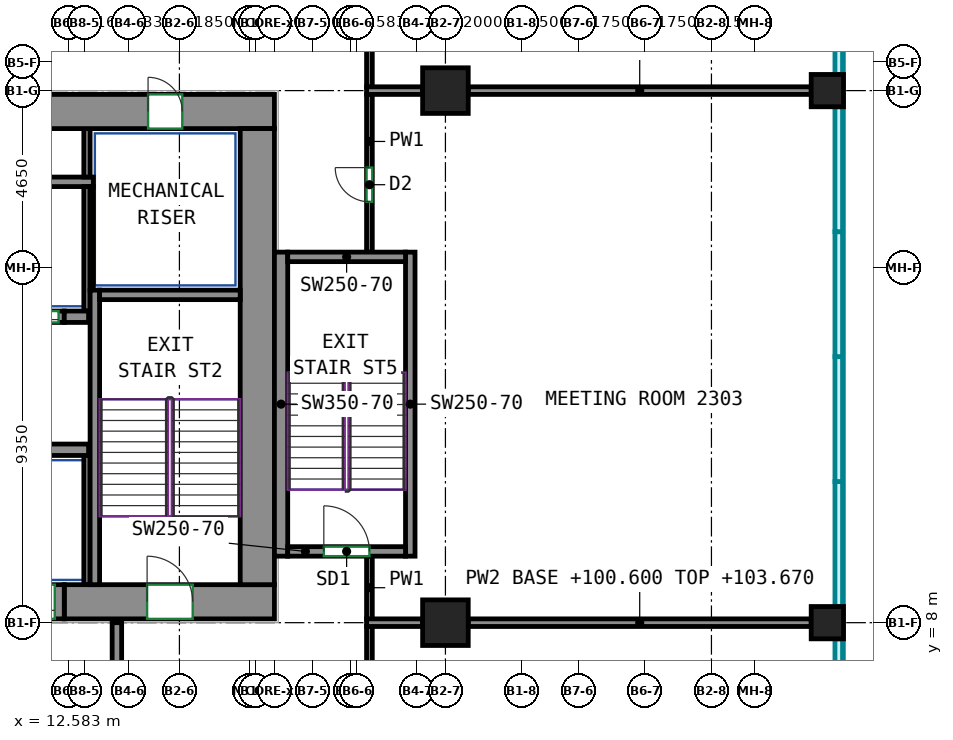
"""IFC4 building model, lengths in metres.
Left out: names, types, materials, properties, quantities, classifications, styles, units other than length and angle.
Written with IfcOpenShell. Run it as: python <this file> out.ifc"""

import sys

from ifc_helpers import new_model, si_unit, direction, frame, frame_2d, origin, origin_2d, place, context, subcontext, project, spatial, rectangle, extrude, source, transform, mapped, element, fill, save


model = new_model("IFC4")
c1 = context("Model", 3, precision=1e-05, world=origin(), true_north=direction((0.0, 1.0)))
c2 = subcontext(c1, "Body", "Model", "MODEL_VIEW")
j1 = project(units=[si_unit("LENGTHUNIT", "METRE"), si_unit("PLANEANGLEUNIT", "RADIAN")], contexts=[c1])
p1 = place(None, origin())
s1 = spatial("IfcSite", under=j1, at=p1, CompositionType="ELEMENT")
p2 = place(p1, origin())
s2 = spatial("IfcBuilding", under=s1, at=p2, CompositionType="ELEMENT")
p3 = place(p2, frame((0.0, 0.0, 100.6)))
s3 = spatial("IfcBuildingStorey", under=s2, at=p3, CompositionType="ELEMENT", Elevation=100.6)
m1 = source(origin(), c2, "Body", "SweptSolid", [
    extrude(rectangle(XDim=1.2, YDim=1.2, at=origin_2d()), origin(), (0.0, 0.0, 1.0), 3.72),
])
for number, where, z_axis, x_axis in (
    (1, (22.5, 8.0, 0.0), (0.0, 0.0, 1.0), (1.0, 0.0, 0.0)),
    (2, (22.5, 22.0, 0.0), (0.0, 0.0, 1.0), (1.0, 0.0, 0.0)),
):
    element("IfcColumn", number, at=place(p3, frame(where, z_axis=z_axis, x_axis=x_axis)), inside=s3, PredefinedType="COLUMN", context=c2, shape_type="MappedRepresentation", body=[
        mapped(m1, transform((0.0, 0.0, 0.0))),
    ])
m2 = source(origin(), c2, "Body", "SweptSolid", [
    extrude(rectangle(XDim=0.85, YDim=0.85, at=origin_2d()), origin(), (0.0, 0.0, 1.0), 3.72),
])
for number, where, z_axis, x_axis in (
    (3, (32.55, 8.0, 0.0), (0.0, 0.0, 1.0), (1.0, 0.0, 0.0)),
    (4, (32.55, 22.0, 0.0), (0.0, 0.0, 1.0), (1.0, 0.0, 0.0)),
):
    element("IfcColumn", number, at=place(p3, frame(where, z_axis=z_axis, x_axis=x_axis)), inside=s3, PredefinedType="COLUMN", context=c2, shape_type="MappedRepresentation", body=[
        mapped(m2, transform((0.0, 0.0, 0.0))),
    ])
m3 = source(origin(), c2, "Body", "SweptSolid", [
    extrude(rectangle(XDim=5.53, YDim=0.9, at=frame_2d((2.765, 0.0))), origin(), (0.0, 0.0, 1.0), 3.72),
])
p4 = place(p3, frame((12.47, 8.55, 0.0), z_axis=(0.0, 0.0, 1.0), x_axis=(1.0, 0.0, 0.0)))
e5 = element("IfcWall", 5, at=p4, inside=s3, PredefinedType="SHEAR", context=c2, shape_type="MappedRepresentation", body=[
    mapped(m3, transform((0.0, 0.0, 0.0))),
])
p5 = place(p4, frame((2.18, 0.0, 0.0)))
e6 = element("IfcOpeningElement", 6, at=p5, cuts=e5, PredefinedType="OPENING", context=c2, shape_type="SweptSolid", body=[
    extrude(rectangle(XDim=1.2, YDim=2.1, at=frame_2d((0.6, 1.05))), frame((0.0, 0.46, 0.0), z_axis=(0.0, -1.0, 0.0), x_axis=(1.0, 0.0, 0.0)), (0.0, 0.0, 1.0), 0.92),
])
m4 = source(origin(), c2, "Body", "SweptSolid", [
    extrude(rectangle(XDim=33.9, YDim=0.9, at=frame_2d((16.95, 0.0))), origin(), (0.0, 0.0, 1.0), 3.72),
])
p6 = place(p3, frame((-15.9, 21.45, 0.0), z_axis=(0.0, 0.0, 1.0), x_axis=(1.0, 0.0, 0.0)))
e7 = element("IfcWall", 7, at=p6, inside=s3, PredefinedType="SHEAR", context=c2, shape_type="MappedRepresentation", body=[
    mapped(m4, transform((0.0, 0.0, 0.0))),
])
p7 = place(p6, frame((6.008, 0.0, 0.0)))
e8 = element("IfcOpeningElement", 8, at=p7, cuts=e7, PredefinedType="OPENING", context=c2, shape_type="SweptSolid", body=[
    extrude(rectangle(XDim=0.9, YDim=2.1, at=frame_2d((0.45, 1.05))), frame((0.0, 0.46, 0.0), z_axis=(0.0, -1.0, 0.0), x_axis=(1.0, 0.0, 0.0)), (0.0, 0.0, 1.0), 0.92),
])
p8 = place(p6, frame((8.688, 0.0, 0.0)))
e9 = element("IfcOpeningElement", 9, at=p8, cuts=e7, PredefinedType="OPENING", context=c2, shape_type="SweptSolid", body=[
    extrude(rectangle(XDim=0.9, YDim=2.1, at=frame_2d((0.45, 1.05))), frame((0.0, 0.46, 0.0), z_axis=(0.0, -1.0, 0.0), x_axis=(1.0, 0.0, 0.0)), (0.0, 0.0, 1.0), 0.92),
])
p9 = place(p6, frame((12.185, 0.0, 0.0)))
e10 = element("IfcOpeningElement", 10, at=p9, cuts=e7, PredefinedType="OPENING", context=c2, shape_type="SweptSolid", body=[
    extrude(rectangle(XDim=0.9, YDim=2.1, at=frame_2d((0.45, 1.05))), frame((0.0, 0.46, 0.0), z_axis=(0.0, -1.0, 0.0), x_axis=(1.0, 0.0, 0.0)), (0.0, 0.0, 1.0), 0.92),
])
p10 = place(p6, frame((16.138, 0.0, 0.0)))
e11 = element("IfcOpeningElement", 11, at=p10, cuts=e7, PredefinedType="OPENING", context=c2, shape_type="SweptSolid", body=[
    extrude(rectangle(XDim=0.9, YDim=2.1, at=frame_2d((0.45, 1.05))), frame((0.0, 0.46, 0.0), z_axis=(0.0, -1.0, 0.0), x_axis=(1.0, 0.0, 0.0)), (0.0, 0.0, 1.0), 0.92),
])
p11 = place(p6, frame((20.962, 0.0, 0.0)))
e12 = element("IfcOpeningElement", 12, at=p11, cuts=e7, PredefinedType="OPENING", context=c2, shape_type="SweptSolid", body=[
    extrude(rectangle(XDim=0.9, YDim=2.1, at=frame_2d((0.45, 1.05))), frame((0.0, 0.46, 0.0), z_axis=(0.0, -1.0, 0.0), x_axis=(1.0, 0.0, 0.0)), (0.0, 0.0, 1.0), 0.92),
])
p12 = place(p6, frame((26.389, 0.0, 0.0)))
e13 = element("IfcOpeningElement", 13, at=p12, cuts=e7, PredefinedType="OPENING", context=c2, shape_type="SweptSolid", body=[
    extrude(rectangle(XDim=0.9, YDim=2.1, at=frame_2d((0.45, 1.05))), frame((0.0, 0.46, 0.0), z_axis=(0.0, -1.0, 0.0), x_axis=(1.0, 0.0, 0.0)), (0.0, 0.0, 1.0), 0.92),
])
p13 = place(p6, frame((2.425, 0.0, 0.0)))
e14 = element("IfcOpeningElement", 14, at=p13, cuts=e7, PredefinedType="OPENING", context=c2, shape_type="SweptSolid", body=[
    extrude(rectangle(XDim=0.9, YDim=2.1, at=frame_2d((0.45, 1.05))), frame((0.0, 0.46, 0.0), z_axis=(0.0, -1.0, 0.0), x_axis=(1.0, 0.0, 0.0)), (0.0, 0.0, 1.0), 0.92),
])
p14 = place(p6, frame((30.575, 0.0, 0.0)))
e15 = element("IfcOpeningElement", 15, at=p14, cuts=e7, PredefinedType="OPENING", context=c2, shape_type="SweptSolid", body=[
    extrude(rectangle(XDim=0.9, YDim=2.1, at=frame_2d((0.45, 1.05))), frame((0.0, 0.46, 0.0), z_axis=(0.0, -1.0, 0.0), x_axis=(1.0, 0.0, 0.0)), (0.0, 0.0, 1.0), 0.92),
])
m5 = source(origin(), c2, "Body", "SweptSolid", [
    extrude(rectangle(XDim=12.0, YDim=0.9, at=frame_2d((6.0, 0.0))), origin(), (0.0, 0.0, 1.0), 3.72),
])
p15 = place(p3, frame((17.55, 9.0, 0.0), z_axis=(0.0, 0.0, 1.0), x_axis=(0.0, 1.0, 0.0)))
e16 = element("IfcWall", 16, at=p15, inside=s3, PredefinedType="SHEAR", context=c2, shape_type="MappedRepresentation", body=[
    mapped(m5, transform((0.0, 0.0, 0.0))),
])
m6 = source(origin(), c2, "Body", "SweptSolid", [
    extrude(rectangle(XDim=7.75, YDim=0.25, at=frame_2d((3.875, 0.0))), origin(), (0.0, 0.0, 1.0), 3.72),
])
p16 = place(p3, frame((13.275, 9.0, 0.0), z_axis=(0.0, 0.0, 1.0), x_axis=(0.0, 1.0, 0.0)))
e17 = element("IfcWall", 17, at=p16, inside=s3, PredefinedType="SHEAR", context=c2, shape_type="MappedRepresentation", body=[
    mapped(m6, transform((0.0, 0.0, 0.0))),
])
m7 = source(origin(), c2, "Body", "SweptSolid", [
    extrude(rectangle(XDim=3.7, YDim=0.25, at=frame_2d((1.85, 0.0))), origin(), (0.0, 0.0, 1.0), 3.72),
])
p17 = place(p3, frame((13.4, 16.625, 0.0), z_axis=(0.0, 0.0, 1.0), x_axis=(1.0, 0.0, 0.0)))
e18 = element("IfcWall", 18, at=p17, inside=s3, PredefinedType="SHEAR", context=c2, shape_type="MappedRepresentation", body=[
    mapped(m7, transform((0.0, 0.0, 0.0))),
])
m8 = source(origin(), c2, "Body", "SweptSolid", [
    extrude(rectangle(XDim=8.0, YDim=0.35, at=frame_2d((4.0, 0.0))), origin(), (0.0, 0.0, 1.0), 3.72),
])
p18 = place(p3, frame((18.175, 9.75, 0.0), z_axis=(0.0, 0.0, 1.0), x_axis=(0.0, 1.0, 0.0)))
e19 = element("IfcWall", 19, at=p18, inside=s3, PredefinedType="SHEAR", context=c2, shape_type="MappedRepresentation", body=[
    mapped(m8, transform((0.0, 0.0, 0.0))),
])
m9 = source(origin(), c2, "Body", "SweptSolid", [
    extrude(rectangle(XDim=8.0, YDim=0.25, at=frame_2d((4.0, 0.0))), origin(), (0.0, 0.0, 1.0), 3.72),
])
p19 = place(p3, frame((21.575, 9.75, 0.0), z_axis=(0.0, 0.0, 1.0), x_axis=(0.0, 1.0, 0.0)))
e20 = element("IfcWall", 20, at=p19, inside=s3, PredefinedType="SHEAR", context=c2, shape_type="MappedRepresentation", body=[
    mapped(m9, transform((0.0, 0.0, 0.0))),
])
m10 = source(origin(), c2, "Body", "SweptSolid", [
    extrude(rectangle(XDim=3.1, YDim=0.25, at=frame_2d((1.55, 0.0))), origin(), (0.0, 0.0, 1.0), 3.72),
])
p20 = place(p3, frame((18.35, 9.875, 0.0), z_axis=(0.0, 0.0, 1.0), x_axis=(1.0, 0.0, 0.0)))
e21 = element("IfcWall", 21, at=p20, inside=s3, PredefinedType="SHEAR", context=c2, shape_type="MappedRepresentation", body=[
    mapped(m10, transform((0.0, 0.0, 0.0))),
])
p21 = place(p20, frame((0.95, 0.0, 0.0)))
e22 = element("IfcOpeningElement", 22, at=p21, cuts=e21, PredefinedType="OPENING", context=c2, shape_type="SweptSolid", body=[
    extrude(rectangle(XDim=1.2, YDim=2.1, at=frame_2d((0.6, 1.05))), frame((0.0, 0.135, 0.0), z_axis=(0.0, -1.0, 0.0), x_axis=(1.0, 0.0, 0.0)), (0.0, 0.0, 1.0), 0.27),
])
p22 = place(p3, frame((18.35, 17.625, 0.0), z_axis=(0.0, 0.0, 1.0), x_axis=(1.0, 0.0, 0.0)))
e23 = element("IfcWall", 23, at=p22, inside=s3, PredefinedType="SHEAR", context=c2, shape_type="MappedRepresentation", body=[
    mapped(m10, transform((0.0, 0.0, 0.0))),
])
m11 = source(origin(), c2, "Body", "SweptSolid", [
    extrude(rectangle(XDim=2.82, YDim=0.3, at=frame_2d((1.41, 0.0))), origin(), (0.0, 0.0, 1.0), 3.72),
])
p23 = place(p3, frame((10.29, 12.55, 0.0), z_axis=(0.0, 0.0, 1.0), x_axis=(1.0, 0.0, 0.0)))
e24 = element("IfcWall", 24, at=p23, inside=s3, PredefinedType="SHEAR", context=c2, shape_type="MappedRepresentation", body=[
    mapped(m11, transform((0.0, 0.0, 0.0))),
])
m12 = source(origin(), c2, "Body", "SweptSolid", [
    extrude(rectangle(XDim=0.64, YDim=0.3, at=frame_2d((0.32, 0.0))), origin(), (0.0, 0.0, 1.0), 3.72),
])
p24 = place(p3, frame((12.47, 16.05, 0.0), z_axis=(0.0, 0.0, 1.0), x_axis=(1.0, 0.0, 0.0)))
e25 = element("IfcWall", 25, at=p24, inside=s3, PredefinedType="SHEAR", context=c2, shape_type="MappedRepresentation", body=[
    mapped(m12, transform((0.0, 0.0, 0.0))),
])
m13 = source(origin(), c2, "Body", "SweptSolid", [
    extrude(rectangle(XDim=1.4, YDim=0.3, at=frame_2d((0.7, 0.0))), origin(), (0.0, 0.0, 1.0), 3.72),
])
p25 = place(p3, frame((11.07, 16.05, 0.0), z_axis=(0.0, 0.0, 1.0), x_axis=(1.0, 0.0, 0.0)))
e26 = element("IfcWall", 26, at=p25, inside=s3, PredefinedType="PARTITIONING", context=c2, shape_type="MappedRepresentation", body=[
    mapped(m13, transform((0.0, 0.0, 0.0))),
])
p26 = place(p25, frame((0.15, 0.0, 0.0)))
e27 = element("IfcOpeningElement", 27, at=p26, cuts=e26, PredefinedType="OPENING", context=c2, shape_type="SweptSolid", body=[
    extrude(rectangle(XDim=1.1, YDim=2.1, at=frame_2d((0.55, 1.05))), frame((0.0, 0.16, 0.0), z_axis=(0.0, -1.0, 0.0), x_axis=(1.0, 0.0, 0.0)), (0.0, 0.0, 1.0), 0.32),
])
m14 = source(origin(), c2, "Body", "SweptSolid", [
    extrude(rectangle(XDim=2.65, YDim=0.25, at=frame_2d((1.325, 0.0))), origin(), (0.0, 0.0, 1.0), 3.72),
])
p27 = place(p3, frame((13.855, 5.35, 0.0), z_axis=(0.0, 0.0, 1.0), x_axis=(0.0, 1.0, 0.0)))
e28 = element("IfcWall", 28, at=p27, inside=s3, PredefinedType="PARTITIONING", context=c2, shape_type="MappedRepresentation", body=[
    mapped(m14, transform((0.0, 0.0, 0.0))),
])
m15 = source(origin(), c2, "Body", "SweptSolid", [
    extrude(rectangle(XDim=19.01, YDim=0.25, at=frame_2d((9.505, 0.0))), origin(), (0.0, 0.0, 1.0), 3.72),
])
p28 = place(p3, frame((-5.775, 19.6, 0.0), z_axis=(0.0, 0.0, 1.0), x_axis=(1.0, 0.0, 0.0)))
e29 = element("IfcWall", 29, at=p28, inside=s3, PredefinedType="PARTITIONING", context=c2, shape_type="MappedRepresentation", body=[
    mapped(m15, transform((0.0, 0.0, 0.0))),
])
m16 = source(origin(), c2, "Body", "SweptSolid", [
    extrude(rectangle(XDim=3.275, YDim=0.165, at=frame_2d((1.638, 0.0))), origin(), (0.0, 0.0, 1.0), 3.72),
])
p29 = place(p3, frame((13.067, 16.2, 0.0), z_axis=(0.0, 0.0, 1.0), x_axis=(0.0, 1.0, 0.0)))
e30 = element("IfcWall", 30, at=p29, inside=s3, PredefinedType="PARTITIONING", context=c2, shape_type="MappedRepresentation", body=[
    mapped(m16, transform((0.0, 0.0, 0.0))),
])
m17 = source(origin(), c2, "Body", "SweptSolid", [
    extrude(rectangle(XDim=1.275, YDim=0.165, at=frame_2d((0.637, 0.0))), origin(), (0.0, 0.0, 1.0), 3.72),
])
p30 = place(p3, frame((13.067, 19.725, 0.0), z_axis=(0.0, 0.0, 1.0), x_axis=(0.0, 1.0, 0.0)))
e31 = element("IfcWall", 31, at=p30, inside=s3, PredefinedType="PARTITIONING", context=c2, shape_type="MappedRepresentation", body=[
    mapped(m17, transform((0.0, 0.0, 0.0))),
])
m18 = source(origin(), c2, "Body", "SweptSolid", [
    extrude(rectangle(XDim=2.725, YDim=0.085, at=frame_2d((1.363, 0.0))), origin(), (0.0, 0.0, 1.0), 3.72),
])
p31 = place(p3, frame((13.192, 16.75, 0.0), z_axis=(0.0, 0.0, 1.0), x_axis=(0.0, 1.0, 0.0)))
e32 = element("IfcWall", 32, at=p31, inside=s3, PredefinedType="PARTITIONING", context=c2, shape_type="MappedRepresentation", body=[
    mapped(m18, transform((0.0, 0.0, 0.0))),
])
m19 = source(origin(), c2, "Body", "SweptSolid", [
    extrude(rectangle(XDim=3.4, YDim=0.165, at=frame_2d((1.7, 0.0))), origin(), (0.0, 0.0, 1.0), 3.72),
])
p32 = place(p3, frame((13.067, 9.0, 0.0), z_axis=(0.0, 0.0, 1.0), x_axis=(0.0, 1.0, 0.0)))
e33 = element("IfcWall", 33, at=p32, inside=s3, PredefinedType="PARTITIONING", context=c2, shape_type="MappedRepresentation", body=[
    mapped(m19, transform((0.0, 0.0, 0.0))),
])
m20 = source(origin(), c2, "Body", "SweptSolid", [
    extrude(rectangle(XDim=1.4, YDim=0.9, at=frame_2d((0.7, 0.0))), origin(), (0.0, 0.0, 1.0), 2.7),
])
p33 = place(p3, frame((11.07, 8.55, 0.0), z_axis=(0.0, 0.0, 1.0), x_axis=(1.0, 0.0, 0.0)))
e34 = element("IfcWall", 34, at=p33, inside=s3, PredefinedType="PARTITIONING", context=c2, shape_type="MappedRepresentation", body=[
    mapped(m20, transform((0.0, 0.0, 0.0))),
])
p34 = place(p33, frame((0.25, 0.0, 0.0)))
e35 = element("IfcOpeningElement", 35, at=p34, cuts=e34, PredefinedType="OPENING", context=c2, shape_type="SweptSolid", body=[
    extrude(rectangle(XDim=0.9, YDim=2.1, at=frame_2d((0.45, 1.05))), frame((0.0, 0.46, 0.0), z_axis=(0.0, -1.0, 0.0), x_axis=(1.0, 0.0, 0.0)), (0.0, 0.0, 1.0), 0.92),
])
p35 = place(p3, frame((20.5, 4.35, 0.0), z_axis=(0.0, 0.0, 1.0), x_axis=(0.0, 1.0, 0.0)))
e36 = element("IfcWall", 36, at=p35, inside=s3, PredefinedType="PARTITIONING", context=c2, shape_type="SweptSolid", body=[
    extrude(rectangle(XDim=3.56, YDim=0.15, at=frame_2d((1.78, 0.0))), origin(), (0.0, 0.0, 1.0), 3.72),
])
p36 = place(p3, frame((20.5, 17.75, 0.0), z_axis=(0.0, 0.0, 1.0), x_axis=(0.0, 1.0, 0.0)))
e37 = element("IfcWall", 37, at=p36, inside=s3, PredefinedType="PARTITIONING", context=c2, shape_type="SweptSolid", body=[
    extrude(rectangle(XDim=4.16, YDim=0.15, at=frame_2d((2.08, 0.0))), origin(), (0.0, 0.0, 1.0), 3.72),
])
p37 = place(p36, frame((1.324, 0.0, 0.0)))
e38 = element("IfcOpeningElement", 38, at=p37, cuts=e37, PredefinedType="OPENING", context=c2, shape_type="SweptSolid", body=[
    extrude(rectangle(XDim=0.9, YDim=2.1, at=frame_2d((0.45, 1.05))), frame((0.0, 0.085, 0.0), z_axis=(0.0, -1.0, 0.0), x_axis=(1.0, 0.0, 0.0)), (0.0, 0.0, 1.0), 0.17),
])
p38 = place(p3, frame((20.5, 8.09, 0.0), z_axis=(0.0, 0.0, 1.0), x_axis=(0.0, 1.0, 0.0)))
e39 = element("IfcWall", 39, at=p38, inside=s3, PredefinedType="PARTITIONING", context=c2, shape_type="SweptSolid", body=[
    extrude(rectangle(XDim=1.66, YDim=0.15, at=frame_2d((0.83, 0.0))), origin(), (0.0, 0.0, 1.0), 3.72),
])
p39 = place(p3, frame((20.5, 22.09, 0.0), z_axis=(0.0, 0.0, 1.0), x_axis=(0.0, 1.0, 0.0)))
e40 = element("IfcWall", 40, at=p39, inside=s3, PredefinedType="PARTITIONING", context=c2, shape_type="SweptSolid", body=[
    extrude(rectangle(XDim=2.235, YDim=0.15, at=frame_2d((1.117, 0.0))), origin(), (0.0, 0.0, 1.0), 3.72),
])
p40 = place(p3, frame((20.426, 8.0, 0.0), z_axis=(0.0, 0.0, 1.0), x_axis=(1.0, 0.0, 0.0)))
e41 = element("IfcWall", 41, at=p40, inside=s3, PredefinedType="PARTITIONING", context=c2, shape_type="SweptSolid", body=[
    extrude(rectangle(XDim=1.474, YDim=0.2, at=frame_2d((0.737, 0.0))), origin(), (0.0, 0.0, 1.0), 3.72),
])
for number, where, z_axis, x_axis in (
    (42, (23.1, 8.0, 0.0), (0.0, 0.0, 1.0), (1.0, 0.0, 0.0)),
    (43, (23.1, 22.0, 0.0), (0.0, 0.0, 1.0), (1.0, 0.0, 0.0)),
):
    element("IfcWall", number, at=place(p3, frame(where, z_axis=z_axis, x_axis=x_axis)), inside=s3, PredefinedType="PARTITIONING", context=c2, shape_type="SweptSolid", body=[
        extrude(rectangle(XDim=9.025, YDim=0.2, at=frame_2d((4.512, 0.0))), origin(), (0.0, 0.0, 1.0), 3.07),
    ])
p41 = place(p3, frame((20.426, 22.0, 0.0), z_axis=(0.0, 0.0, 1.0), x_axis=(1.0, 0.0, 0.0)))
e44 = element("IfcWall", 44, at=p41, inside=s3, PredefinedType="PARTITIONING", context=c2, shape_type="SweptSolid", body=[
    extrude(rectangle(XDim=1.474, YDim=0.2, at=frame_2d((0.737, 0.0))), origin(), (0.0, 0.0, 1.0), 3.72),
])
p42 = place(p34, origin())
e45 = element("IfcDoor", 45, at=p42, inside=s3, OperationType="SLIDING_TO_LEFT", PredefinedType="DOOR", context=c2, shape_type="SweptSolid", body=[
    extrude(rectangle(XDim=0.9, YDim=2.1, at=frame_2d((0.45, 1.05))), frame((0.0, 0.355, 0.0), z_axis=(0.0, -1.0, 0.0), x_axis=(1.0, 0.0, 0.0)), (0.0, 0.0, 1.0), 0.05),
])
fill(e35, e45)
p43 = place(p26, origin())
e46 = element("IfcDoor", 46, at=p43, inside=s3, OperationType="DOUBLE_DOOR_SLIDING", PredefinedType="DOOR", context=c2, shape_type="SweptSolid", body=[
    extrude(rectangle(XDim=1.1, YDim=2.1, at=frame_2d((0.55, 1.05))), frame((0.0, 0.025, 0.0), z_axis=(0.0, -1.0, 0.0), x_axis=(1.0, 0.0, 0.0)), (0.0, 0.0, 1.0), 0.05),
])
fill(e27, e46)
p44 = place(p14, origin())
e47 = element("IfcDoor", 47, at=p44, inside=s3, OperationType="SINGLE_SWING_LEFT", PredefinedType="DOOR", context=c2, shape_type="SweptSolid", body=[
    extrude(rectangle(XDim=0.9, YDim=2.1, at=frame_2d((0.45, 1.05))), frame((0.0, -0.305, 0.0), z_axis=(0.0, -1.0, 0.0), x_axis=(1.0, 0.0, 0.0)), (0.0, 0.0, 1.0), 0.05),
])
fill(e15, e47)
p45 = place(p5, origin())
e48 = element("IfcDoor", 48, at=p45, inside=s3, OperationType="DOUBLE_DOOR_SINGLE_SWING", PredefinedType="DOOR", context=c2, shape_type="SweptSolid", body=[
    extrude(rectangle(XDim=1.2, YDim=2.1, at=frame_2d((0.6, 1.05))), frame((0.0, 0.355, 0.0), z_axis=(0.0, -1.0, 0.0), x_axis=(1.0, 0.0, 0.0)), (0.0, 0.0, 1.0), 0.05),
])
fill(e6, e48)
p46 = place(p21, origin())
e49 = element("IfcDoor", 49, at=p46, inside=s3, OperationType="DOUBLE_DOOR_SINGLE_SWING", PredefinedType="DOOR", context=c2, shape_type="SweptSolid", body=[
    extrude(rectangle(XDim=1.2, YDim=2.1, at=frame_2d((0.6, 1.05))), frame((0.0, 0.025, 0.0), z_axis=(0.0, -1.0, 0.0), x_axis=(1.0, 0.0, 0.0)), (0.0, 0.0, 1.0), 0.05),
])
fill(e22, e49)
p47 = place(p37, origin())
e50 = element("IfcDoor", 50, at=p47, inside=s3, OperationType="SINGLE_SWING_RIGHT", PredefinedType="DOOR", context=c2, shape_type="SweptSolid", body=[
    extrude(rectangle(XDim=0.9, YDim=2.1, at=frame_2d((0.45, 1.05))), frame((0.0, 0.025, 0.0), z_axis=(0.0, -1.0, 0.0), x_axis=(1.0, 0.0, 0.0)), (0.0, 0.0, 1.0), 0.05),
])
fill(e38, e50)
save(model, sys.argv[1])
